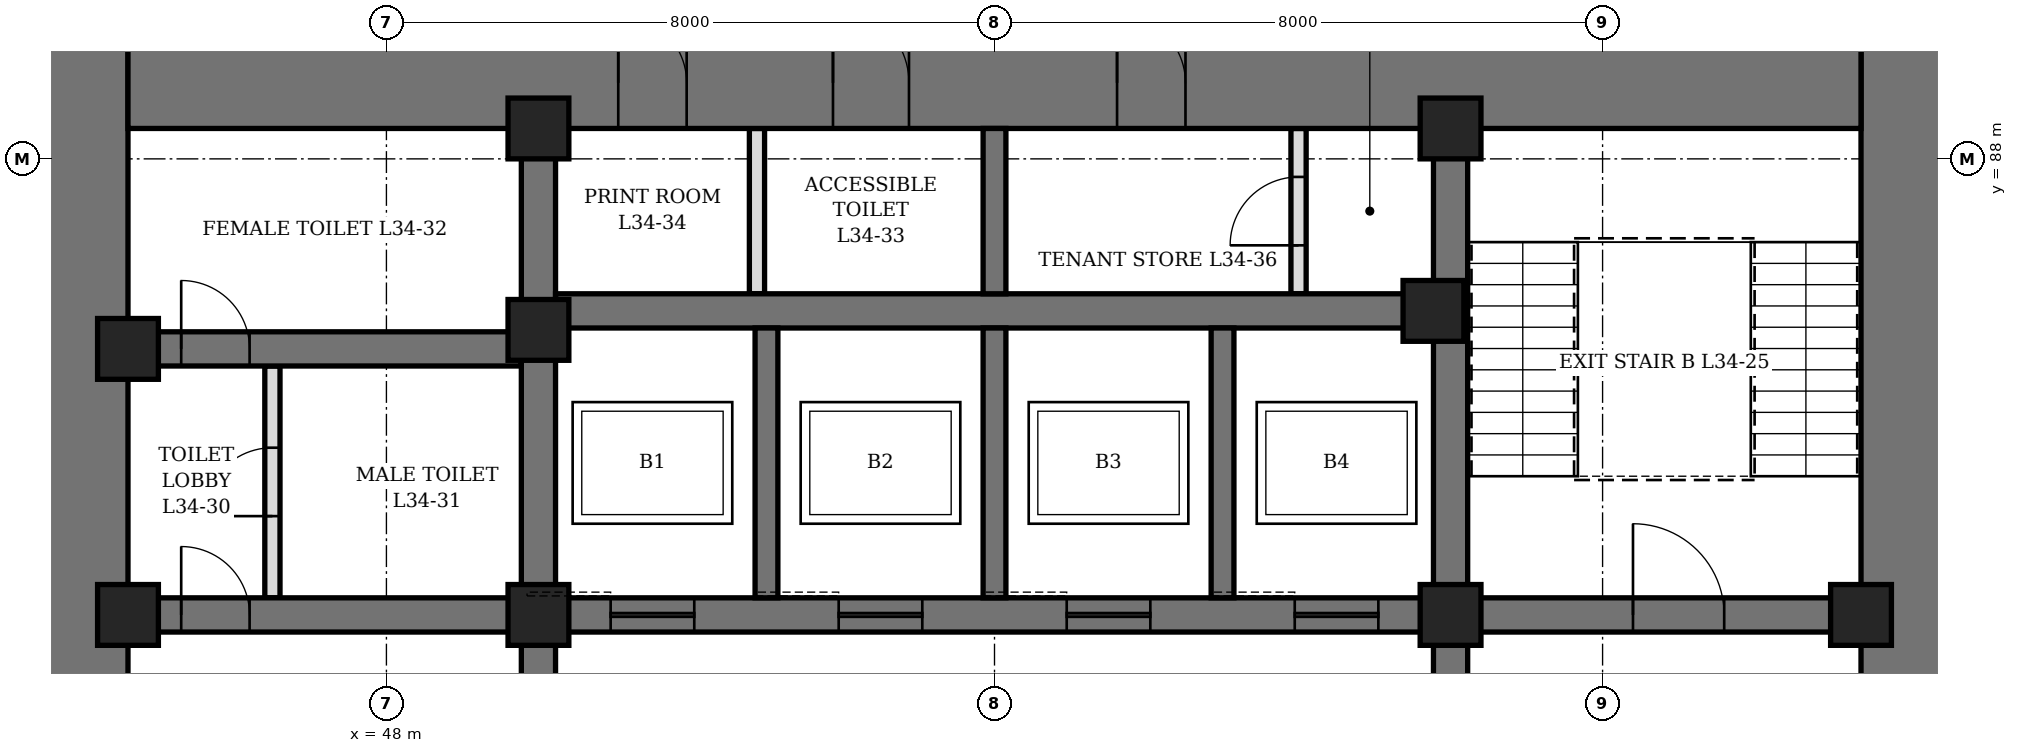
"""IFC4 building model, lengths in metres.
Left out: names, types, materials, properties, quantities, classifications, styles, units other than length and angle.
Written with IfcOpenShell. Run it as: python <this file> out.ifc"""

import sys

from ifc_helpers import new_model, si_unit, direction, frame, frame_2d, origin, origin_2d, place, context, subcontext, project, spatial, rectangle, hollow_rectangle, extrude, element, fill, save


model = new_model("IFC4")
c1 = context("Model", 3, precision=1e-05, world=origin(), true_north=direction((0.0, 1.0)))
c2 = subcontext(c1, "Body", "Model", "MODEL_VIEW")
j1 = project(units=[si_unit("LENGTHUNIT", "METRE"), si_unit("PLANEANGLEUNIT", "RADIAN")], contexts=[c1])
p1 = place(None, origin())
s1 = spatial("IfcSite", under=j1, at=p1, CompositionType="ELEMENT")
p2 = place(p1, origin())
s2 = spatial("IfcBuilding", under=s1, at=p2, CompositionType="ELEMENT")
p3 = place(p2, frame((0.0, 0.0, 154.3)))
s3 = spatial("IfcBuildingStorey", under=s2, at=p3, CompositionType="ELEMENT", Elevation=154.3)
p4 = place(p3, frame((44.0, 70.4, 0.0), z_axis=(0.0, 0.0, 1.0), x_axis=(0.0, 1.0, 0.0)))
e1 = element("IfcWall", 1, at=p4, inside=s3, PredefinedType="SHEAR", context=c2, shape_type="SweptSolid", body=[
    extrude(rectangle(XDim=19.2, YDim=1.2, at=frame_2d((9.6, 0.0))), origin(), (0.0, 0.0, 1.0), 4.2),
])
p5 = place(p4, frame((8.6, 0.0, 0.0)))
e2 = element("IfcOpeningElement", 2, at=p5, cuts=e1, PredefinedType="OPENING", context=c2, shape_type="SweptSolid", body=[
    extrude(rectangle(XDim=2.0, YDim=2.4, at=frame_2d((1.0, 1.2))), frame((0.0, 0.61, 0.0), z_axis=(0.0, -1.0, 0.0), x_axis=(1.0, 0.0, 0.0)), (0.0, 0.0, 1.0), 1.22),
])
p6 = place(p3, frame((68.0, 70.4, 0.0), z_axis=(0.0, 0.0, 1.0), x_axis=(0.0, 1.0, 0.0)))
e3 = element("IfcWall", 3, at=p6, inside=s3, PredefinedType="SHEAR", context=c2, shape_type="SweptSolid", body=[
    extrude(rectangle(XDim=19.2, YDim=1.2, at=frame_2d((9.6, 0.0))), origin(), (0.0, 0.0, 1.0), 4.2),
])
p7 = place(p6, frame((8.6, 0.0, 0.0)))
e4 = element("IfcOpeningElement", 4, at=p7, cuts=e3, PredefinedType="OPENING", context=c2, shape_type="SweptSolid", body=[
    extrude(rectangle(XDim=2.0, YDim=2.4, at=frame_2d((1.0, 1.2))), frame((0.0, 0.61, 0.0), z_axis=(0.0, -1.0, 0.0), x_axis=(1.0, 0.0, 0.0)), (0.0, 0.0, 1.0), 1.22),
])
p8 = place(p3, frame((44.6, 89.0, 0.0), z_axis=(0.0, 0.0, 1.0), x_axis=(1.0, 0.0, 0.0)))
e5 = element("IfcWall", 5, at=p8, inside=s3, PredefinedType="SHEAR", context=c2, shape_type="SweptSolid", body=[
    extrude(rectangle(XDim=22.8, YDim=1.2, at=frame_2d((11.4, 0.0))), origin(), (0.0, 0.0, 1.0), 4.2),
])
p9 = place(p8, frame((9.275, 0.0, 0.0)))
e6 = element("IfcOpeningElement", 6, at=p9, cuts=e5, PredefinedType="OPENING", context=c2, shape_type="SweptSolid", body=[
    extrude(rectangle(XDim=1.0, YDim=2.1, at=frame_2d((0.5, 1.05))), frame((0.0, 0.61, 0.0), z_axis=(0.0, -1.0, 0.0), x_axis=(1.0, 0.0, 0.0)), (0.0, 0.0, 1.0), 1.22),
])
p10 = place(p8, frame((6.45, 0.0, 0.0)))
e7 = element("IfcOpeningElement", 7, at=p10, cuts=e5, PredefinedType="OPENING", context=c2, shape_type="SweptSolid", body=[
    extrude(rectangle(XDim=0.9, YDim=2.1, at=frame_2d((0.45, 1.05))), frame((0.0, 0.61, 0.0), z_axis=(0.0, -1.0, 0.0), x_axis=(1.0, 0.0, 0.0)), (0.0, 0.0, 1.0), 1.22),
])
p11 = place(p8, frame((13.012, 0.0, 0.0)))
e8 = element("IfcOpeningElement", 8, at=p11, cuts=e5, PredefinedType="OPENING", context=c2, shape_type="SweptSolid", body=[
    extrude(rectangle(XDim=0.9, YDim=2.1, at=frame_2d((0.45, 1.05))), frame((0.0, 0.61, 0.0), z_axis=(0.0, -1.0, 0.0), x_axis=(1.0, 0.0, 0.0)), (0.0, 0.0, 1.0), 1.22),
])
p12 = place(p3, frame((50.0, 71.6, 0.0), z_axis=(0.0, 0.0, 1.0), x_axis=(0.0, 1.0, 0.0)))
e9 = element("IfcWall", 9, at=p12, inside=s3, PredefinedType="SHEAR", context=c2, shape_type="SweptSolid", body=[
    extrude(rectangle(XDim=16.8, YDim=0.45, at=frame_2d((8.4, 0.0))), origin(), (0.0, 0.0, 1.0), 4.2),
])
p13 = place(p12, frame((7.5, 0.0, 0.0)))
e10 = element("IfcOpeningElement", 10, at=p13, cuts=e9, PredefinedType="OPENING", context=c2, shape_type="SweptSolid", body=[
    extrude(rectangle(XDim=1.8, YDim=2.4, at=frame_2d((0.9, 1.2))), frame((0.0, 0.235, 0.0), z_axis=(0.0, -1.0, 0.0), x_axis=(1.0, 0.0, 0.0)), (0.0, 0.0, 1.0), 0.47),
])
p14 = place(p3, frame((62.0, 71.6, 0.0), z_axis=(0.0, 0.0, 1.0), x_axis=(0.0, 1.0, 0.0)))
e11 = element("IfcWall", 11, at=p14, inside=s3, PredefinedType="SHEAR", context=c2, shape_type="SweptSolid", body=[
    extrude(rectangle(XDim=16.8, YDim=0.45, at=frame_2d((8.4, 0.0))), origin(), (0.0, 0.0, 1.0), 4.2),
])
p15 = place(p14, frame((7.5, 0.0, 0.0)))
e12 = element("IfcOpeningElement", 12, at=p15, cuts=e11, PredefinedType="OPENING", context=c2, shape_type="SweptSolid", body=[
    extrude(rectangle(XDim=1.8, YDim=2.4, at=frame_2d((0.9, 1.2))), frame((0.0, 0.235, 0.0), z_axis=(0.0, -1.0, 0.0), x_axis=(1.0, 0.0, 0.0)), (0.0, 0.0, 1.0), 0.47),
])
p16 = place(p3, frame((44.6, 82.0, 0.0), z_axis=(0.0, 0.0, 1.0), x_axis=(1.0, 0.0, 0.0)))
e13 = element("IfcWall", 13, at=p16, inside=s3, PredefinedType="SHEAR", context=c2, shape_type="SweptSolid", body=[
    extrude(rectangle(XDim=5.175, YDim=0.45, at=frame_2d((2.587, 0.0))), origin(), (0.0, 0.0, 1.0), 4.2),
])
p17 = place(p16, frame((0.7, 0.0, 0.0)))
e14 = element("IfcOpeningElement", 14, at=p17, cuts=e13, PredefinedType="OPENING", context=c2, shape_type="SweptSolid", body=[
    extrude(rectangle(XDim=0.9, YDim=2.1, at=frame_2d((0.45, 1.05))), frame((0.0, 0.235, 0.0), z_axis=(0.0, -1.0, 0.0), x_axis=(1.0, 0.0, 0.0)), (0.0, 0.0, 1.0), 0.47),
])
p18 = place(p3, frame((44.6, 85.5, 0.0), z_axis=(0.0, 0.0, 1.0), x_axis=(1.0, 0.0, 0.0)))
e15 = element("IfcWall", 15, at=p18, inside=s3, PredefinedType="SHEAR", context=c2, shape_type="SweptSolid", body=[
    extrude(rectangle(XDim=5.175, YDim=0.45, at=frame_2d((2.587, 0.0))), origin(), (0.0, 0.0, 1.0), 4.2),
])
p19 = place(p18, frame((0.7, 0.0, 0.0)))
e16 = element("IfcOpeningElement", 16, at=p19, cuts=e15, PredefinedType="OPENING", context=c2, shape_type="SweptSolid", body=[
    extrude(rectangle(XDim=0.9, YDim=2.1, at=frame_2d((0.45, 1.05))), frame((0.0, 0.235, 0.0), z_axis=(0.0, -1.0, 0.0), x_axis=(1.0, 0.0, 0.0)), (0.0, 0.0, 1.0), 0.47),
])
p20 = place(p3, frame((62.225, 82.0, 0.0), z_axis=(0.0, 0.0, 1.0), x_axis=(1.0, 0.0, 0.0)))
e17 = element("IfcWall", 17, at=p20, inside=s3, PredefinedType="SHEAR", context=c2, shape_type="SweptSolid", body=[
    extrude(rectangle(XDim=5.175, YDim=0.45, at=frame_2d((2.587, 0.0))), origin(), (0.0, 0.0, 1.0), 4.2),
])
p21 = place(p20, frame((2.175, 0.0, 0.0)))
e18 = element("IfcOpeningElement", 18, at=p21, cuts=e17, PredefinedType="OPENING", context=c2, shape_type="SweptSolid", body=[
    extrude(rectangle(XDim=1.2, YDim=2.1, at=frame_2d((0.6, 1.05))), frame((0.0, 0.235, 0.0), z_axis=(0.0, -1.0, 0.0), x_axis=(1.0, 0.0, 0.0)), (0.0, 0.0, 1.0), 0.47),
])
p22 = place(p3, frame((50.225, 82.0, 0.0), z_axis=(0.0, 0.0, 1.0), x_axis=(1.0, 0.0, 0.0)))
e19 = element("IfcWall", 19, at=p22, inside=s3, PredefinedType="SHEAR", context=c2, shape_type="SweptSolid", body=[
    extrude(rectangle(XDim=11.55, YDim=0.45, at=frame_2d((5.775, 0.0))), origin(), (0.0, 0.0, 1.0), 4.2),
])
p23 = place(p22, frame((0.725, 0.0, 0.0)))
e20 = element("IfcOpeningElement", 20, at=p23, cuts=e19, PredefinedType="OPENING", context=c2, shape_type="SweptSolid", body=[
    extrude(rectangle(XDim=1.1, YDim=2.2, at=frame_2d((0.55, 1.1))), frame((0.0, 0.235, 0.0), z_axis=(0.0, -1.0, 0.0), x_axis=(1.0, 0.0, 0.0)), (0.0, 0.0, 1.0), 0.47),
])
p24 = place(p22, frame((3.725, 0.0, 0.0)))
e21 = element("IfcOpeningElement", 21, at=p24, cuts=e19, PredefinedType="OPENING", context=c2, shape_type="SweptSolid", body=[
    extrude(rectangle(XDim=1.1, YDim=2.2, at=frame_2d((0.55, 1.1))), frame((0.0, 0.235, 0.0), z_axis=(0.0, -1.0, 0.0), x_axis=(1.0, 0.0, 0.0)), (0.0, 0.0, 1.0), 0.47),
])
p25 = place(p22, frame((6.725, 0.0, 0.0)))
e22 = element("IfcOpeningElement", 22, at=p25, cuts=e19, PredefinedType="OPENING", context=c2, shape_type="SweptSolid", body=[
    extrude(rectangle(XDim=1.1, YDim=2.2, at=frame_2d((0.55, 1.1))), frame((0.0, 0.235, 0.0), z_axis=(0.0, -1.0, 0.0), x_axis=(1.0, 0.0, 0.0)), (0.0, 0.0, 1.0), 0.47),
])
p26 = place(p22, frame((9.725, 0.0, 0.0)))
e23 = element("IfcOpeningElement", 23, at=p26, cuts=e19, PredefinedType="OPENING", context=c2, shape_type="SweptSolid", body=[
    extrude(rectangle(XDim=1.1, YDim=2.2, at=frame_2d((0.55, 1.1))), frame((0.0, 0.235, 0.0), z_axis=(0.0, -1.0, 0.0), x_axis=(1.0, 0.0, 0.0)), (0.0, 0.0, 1.0), 0.47),
])
p27 = place(p3, frame((50.225, 86.0, 0.0), z_axis=(0.0, 0.0, 1.0), x_axis=(1.0, 0.0, 0.0)))
e24 = element("IfcWall", 24, at=p27, inside=s3, PredefinedType="SHEAR", context=c2, shape_type="SweptSolid", body=[
    extrude(rectangle(XDim=11.55, YDim=0.45, at=frame_2d((5.775, 0.0))), origin(), (0.0, 0.0, 1.0), 4.2),
])
for number, where, z_axis, x_axis in (
    (25, (53.0, 82.225, 0.0), (0.0, 0.0, 1.0), (0.0, 1.0, 0.0)),
    (26, (56.0, 82.225, 0.0), (0.0, 0.0, 1.0), (0.0, 1.0, 0.0)),
    (27, (59.0, 82.225, 0.0), (0.0, 0.0, 1.0), (0.0, 1.0, 0.0)),
):
    element("IfcWall", number, at=place(p3, frame(where, z_axis=z_axis, x_axis=x_axis)), inside=s3, PredefinedType="SHEAR", context=c2, shape_type="SweptSolid", body=[
        extrude(rectangle(XDim=3.55, YDim=0.3, at=frame_2d((1.775, 0.0))), origin(), (0.0, 0.0, 1.0), 4.2),
    ])
p28 = place(p3, frame((56.0, 86.225, 0.0), z_axis=(0.0, 0.0, 1.0), x_axis=(0.0, 1.0, 0.0)))
e28 = element("IfcWall", 28, at=p28, inside=s3, PredefinedType="SHEAR", context=c2, shape_type="SweptSolid", body=[
    extrude(rectangle(XDim=2.175, YDim=0.3, at=frame_2d((1.087, 0.0))), origin(), (0.0, 0.0, 1.0), 4.2),
])
for number, where, z_axis, x_axis in (
    (29, (44.6, 82.0, 0.0), (0.0, 0.0, 1.0), (1.0, 0.0, 0.0)),
    (30, (44.6, 85.5, 0.0), (0.0, 0.0, 1.0), (1.0, 0.0, 0.0)),
    (31, (50.0, 82.0, 0.0), (0.0, 0.0, 1.0), (1.0, 0.0, 0.0)),
    (32, (50.0, 85.75, 0.0), (0.0, 0.0, 1.0), (1.0, 0.0, 0.0)),
    (33, (50.0, 88.4, 0.0), (0.0, 0.0, 1.0), (1.0, 0.0, 0.0)),
    (34, (61.775, 86.0, 0.0), (0.0, 0.0, 1.0), (1.0, 0.0, 0.0)),
    (35, (62.0, 82.0, 0.0), (0.0, 0.0, 1.0), (1.0, 0.0, 0.0)),
    (36, (62.0, 88.4, 0.0), (0.0, 0.0, 1.0), (1.0, 0.0, 0.0)),
    (37, (67.4, 82.0, 0.0), (0.0, 0.0, 1.0), (1.0, 0.0, 0.0)),
):
    element("IfcColumn", number, at=place(p3, frame(where, z_axis=z_axis, x_axis=x_axis)), inside=s3, PredefinedType="COLUMN", context=c2, shape_type="SweptSolid", body=[
        extrude(hollow_rectangle(XDim=0.8, YDim=0.8, WallThickness=0.1, at=origin_2d()), origin(), (0.0, 0.0, 1.0), 4.2),
    ])
p29 = place(p3, frame((46.5, 82.225, 0.0), z_axis=(0.0, 0.0, 1.0), x_axis=(0.0, 1.0, 0.0)))
e38 = element("IfcWall", 38, at=p29, inside=s3, PredefinedType="PARTITIONING", context=c2, shape_type="SweptSolid", body=[
    extrude(rectangle(XDim=3.05, YDim=0.2, at=frame_2d((1.525, 0.0))), origin(), (0.0, 0.0, 1.0), 4.04),
])
p30 = place(p29, frame((1.075, 0.0, 0.0)))
e39 = element("IfcOpeningElement", 39, at=p30, cuts=e38, PredefinedType="OPENING", context=c2, shape_type="SweptSolid", body=[
    extrude(rectangle(XDim=0.9, YDim=2.1, at=frame_2d((0.45, 1.05))), frame((0.0, 0.11, 0.0), z_axis=(0.0, -1.0, 0.0), x_axis=(1.0, 0.0, 0.0)), (0.0, 0.0, 1.0), 0.22),
])
p31 = place(p3, frame((52.875, 86.225, 0.0), z_axis=(0.0, 0.0, 1.0), x_axis=(0.0, 1.0, 0.0)))
e40 = element("IfcWall", 40, at=p31, inside=s3, PredefinedType="PARTITIONING", context=c2, shape_type="SweptSolid", body=[
    extrude(rectangle(XDim=2.175, YDim=0.2, at=frame_2d((1.087, 0.0))), origin(), (0.0, 0.0, 1.0), 3.14),
])
p32 = place(p3, frame((60.0, 86.225, 0.0), z_axis=(0.0, 0.0, 1.0), x_axis=(0.0, 1.0, 0.0)))
e41 = element("IfcWall", 41, at=p32, inside=s3, PredefinedType="PARTITIONING", context=c2, shape_type="SweptSolid", body=[
    extrude(rectangle(XDim=2.175, YDim=0.2, at=frame_2d((1.087, 0.0))), origin(), (0.0, 0.0, 1.0), 4.04),
])
p33 = place(p32, frame((0.637, 0.0, 0.0)))
e42 = element("IfcOpeningElement", 42, at=p33, cuts=e41, PredefinedType="OPENING", context=c2, shape_type="SweptSolid", body=[
    extrude(rectangle(XDim=0.9, YDim=2.1, at=frame_2d((0.45, 1.05))), frame((0.0, 0.11, 0.0), z_axis=(0.0, -1.0, 0.0), x_axis=(1.0, 0.0, 0.0)), (0.0, 0.0, 1.0), 0.22),
])
p34 = place(p17, origin())
e43 = element("IfcDoor", 43, at=p34, inside=s3, OperationType="SINGLE_SWING_LEFT", PredefinedType="DOOR", context=c2, shape_type="SweptSolid", body=[
    extrude(rectangle(XDim=0.9, YDim=2.1, at=frame_2d((0.45, 1.05))), frame((0.0, 0.225, 0.0), z_axis=(0.0, -1.0, 0.0), x_axis=(1.0, 0.0, 0.0)), (0.0, 0.0, 1.0), 0.449),
])
fill(e14, e43)
p35 = place(p30, origin())
e44 = element("IfcDoor", 44, at=p35, inside=s3, OperationType="SINGLE_SWING_RIGHT", PredefinedType="DOOR", context=c2, shape_type="SweptSolid", body=[
    extrude(rectangle(XDim=0.9, YDim=2.1, at=frame_2d((0.45, 1.05))), frame((0.0, 0.1, 0.0), z_axis=(0.0, -1.0, 0.0), x_axis=(1.0, 0.0, 0.0)), (0.0, 0.0, 1.0), 0.199),
])
fill(e39, e44)
p36 = place(p19, origin())
e45 = element("IfcDoor", 45, at=p36, inside=s3, OperationType="SINGLE_SWING_RIGHT", PredefinedType="DOOR", context=c2, shape_type="SweptSolid", body=[
    extrude(rectangle(XDim=0.9, YDim=2.1, at=frame_2d((0.45, 1.05))), frame((0.0, 0.225, 0.0), z_axis=(0.0, -1.0, 0.0), x_axis=(1.0, 0.0, 0.0)), (0.0, 0.0, 1.0), 0.449),
])
fill(e16, e45)
p37 = place(p9, origin())
e46 = element("IfcDoor", 46, at=p37, inside=s3, OperationType="SINGLE_SWING_LEFT", PredefinedType="DOOR", context=c2, shape_type="SweptSolid", body=[
    extrude(rectangle(XDim=1.0, YDim=2.1, at=frame_2d((0.5, 1.05))), frame((0.0, 0.35, 0.0), z_axis=(0.0, -1.0, 0.0), x_axis=(1.0, 0.0, 0.0)), (0.0, 0.0, 1.0), 0.7),
])
fill(e6, e46)
p38 = place(p10, origin())
e47 = element("IfcDoor", 47, at=p38, inside=s3, OperationType="SINGLE_SWING_LEFT", PredefinedType="DOOR", context=c2, shape_type="SweptSolid", body=[
    extrude(rectangle(XDim=0.9, YDim=2.1, at=frame_2d((0.45, 1.05))), frame((0.0, 0.35, 0.0), z_axis=(0.0, -1.0, 0.0), x_axis=(1.0, 0.0, 0.0)), (0.0, 0.0, 1.0), 0.7),
])
fill(e7, e47)
p39 = place(p11, origin())
e48 = element("IfcDoor", 48, at=p39, inside=s3, OperationType="SINGLE_SWING_LEFT", PredefinedType="DOOR", context=c2, shape_type="SweptSolid", body=[
    extrude(rectangle(XDim=0.9, YDim=2.1, at=frame_2d((0.45, 1.05))), frame((0.0, 0.35, 0.0), z_axis=(0.0, -1.0, 0.0), x_axis=(1.0, 0.0, 0.0)), (0.0, 0.0, 1.0), 0.7),
])
fill(e8, e48)
p40 = place(p33, origin())
e49 = element("IfcDoor", 49, at=p40, inside=s3, OperationType="SINGLE_SWING_LEFT", PredefinedType="DOOR", context=c2, shape_type="SweptSolid", body=[
    extrude(rectangle(XDim=0.9, YDim=2.1, at=frame_2d((0.45, 1.05))), frame((0.0, 0.1, 0.0), z_axis=(0.0, -1.0, 0.0), x_axis=(1.0, 0.0, 0.0)), (0.0, 0.0, 1.0), 0.199),
])
fill(e42, e49)
p41 = place(p21, origin())
e50 = element("IfcDoor", 50, at=p41, inside=s3, OperationType="SINGLE_SWING_LEFT", PredefinedType="DOOR", context=c2, shape_type="SweptSolid", body=[
    extrude(rectangle(XDim=1.2, YDim=2.1, at=frame_2d((0.6, 1.05))), frame((0.0, 0.225, 0.0), z_axis=(0.0, -1.0, 0.0), x_axis=(1.0, 0.0, 0.0)), (0.0, 0.0, 1.0), 0.449),
])
fill(e18, e50)
p42 = place(p23, origin())
e51 = element("IfcDoor", 51, at=p42, inside=s3, OperationType="SLIDING_TO_LEFT", PredefinedType="DOOR", context=c2, shape_type="SweptSolid", body=[
    extrude(rectangle(XDim=1.1, YDim=2.2, at=frame_2d((0.55, 1.1))), frame((0.0, 0.225, 0.0), z_axis=(0.0, -1.0, 0.0), x_axis=(1.0, 0.0, 0.0)), (0.0, 0.0, 1.0), 0.449),
])
fill(e20, e51)
p43 = place(p24, origin())
e52 = element("IfcDoor", 52, at=p43, inside=s3, OperationType="SLIDING_TO_LEFT", PredefinedType="DOOR", context=c2, shape_type="SweptSolid", body=[
    extrude(rectangle(XDim=1.1, YDim=2.2, at=frame_2d((0.55, 1.1))), frame((0.0, 0.225, 0.0), z_axis=(0.0, -1.0, 0.0), x_axis=(1.0, 0.0, 0.0)), (0.0, 0.0, 1.0), 0.449),
])
fill(e21, e52)
p44 = place(p25, origin())
e53 = element("IfcDoor", 53, at=p44, inside=s3, OperationType="SLIDING_TO_LEFT", PredefinedType="DOOR", context=c2, shape_type="SweptSolid", body=[
    extrude(rectangle(XDim=1.1, YDim=2.2, at=frame_2d((0.55, 1.1))), frame((0.0, 0.225, 0.0), z_axis=(0.0, -1.0, 0.0), x_axis=(1.0, 0.0, 0.0)), (0.0, 0.0, 1.0), 0.449),
])
fill(e22, e53)
p45 = place(p26, origin())
e54 = element("IfcDoor", 54, at=p45, inside=s3, OperationType="SLIDING_TO_LEFT", PredefinedType="DOOR", context=c2, shape_type="SweptSolid", body=[
    extrude(rectangle(XDim=1.1, YDim=2.2, at=frame_2d((0.55, 1.1))), frame((0.0, 0.225, 0.0), z_axis=(0.0, -1.0, 0.0), x_axis=(1.0, 0.0, 0.0)), (0.0, 0.0, 1.0), 0.449),
])
fill(e23, e54)
save(model, sys.argv[1])
